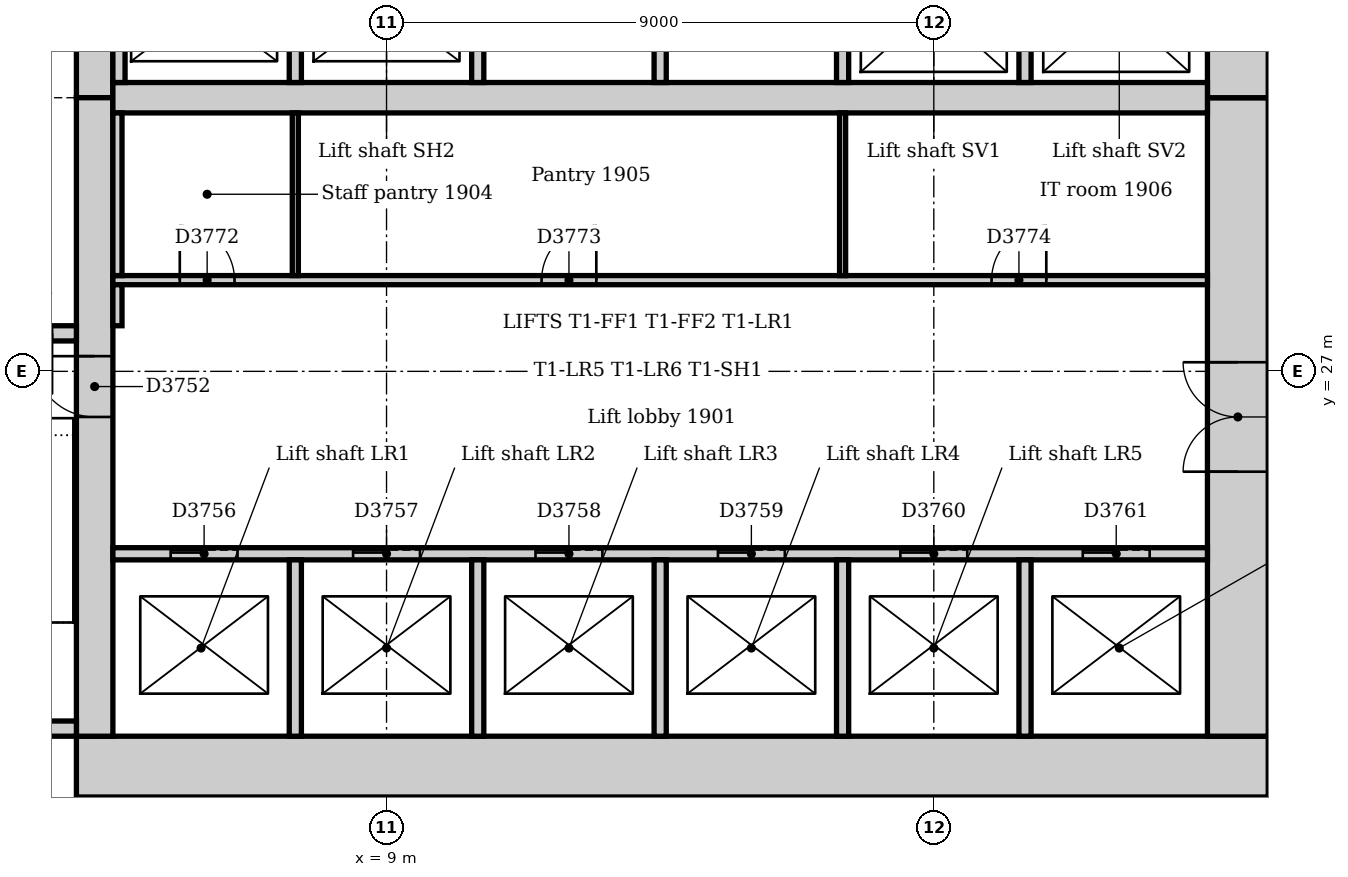
"""IFC4 building model, lengths in metres.
Left out: names, types, materials, properties, quantities, classifications, styles, units other than length and angle.
Written with IfcOpenShell. Run it as: python <this file> out.ifc"""

import sys

from ifc_helpers import new_model, si_unit, direction, frame, frame_2d, origin, place, context, subcontext, project, spatial, rectangle, extrude, element, fill, save


model = new_model("IFC4")
c1 = context("Model", 3, precision=1e-05, world=origin(), true_north=direction((0.0, 1.0)))
c2 = subcontext(c1, "Body", "Model", "MODEL_VIEW")
j1 = project(units=[si_unit("LENGTHUNIT", "METRE"), si_unit("PLANEANGLEUNIT", "RADIAN")], contexts=[c1])
p1 = place(None, origin())
s1 = spatial("IfcSite", under=j1, at=p1, CompositionType="ELEMENT")
p2 = place(p1, origin())
s2 = spatial("IfcBuilding", under=s1, at=p2, CompositionType="ELEMENT")
p3 = place(p2, frame((0.0, 0.0, 83.0)))
s3 = spatial("IfcBuildingStorey", under=s2, at=p3, CompositionType="ELEMENT", Elevation=83.0)
p4 = place(p3, frame((3.9, 20.5, 0.0), z_axis=(0.0, 0.0, 1.0), x_axis=(1.0, 0.0, 0.0)))
e1 = element("IfcWall", 1, at=p4, inside=s3, PredefinedType="SOLIDWALL", context=c2, shape_type="SweptSolid", body=[
    extrude(rectangle(XDim=19.6, YDim=1.0, at=frame_2d((9.8, 0.0))), origin(), (0.0, 0.0, 1.0), 4.0),
])
p5 = place(p3, frame((23.0, 21.0, 0.0), z_axis=(0.0, 0.0, 1.0), x_axis=(0.0, 1.0, 0.0)))
e2 = element("IfcWall", 2, at=p5, inside=s3, PredefinedType="SOLIDWALL", context=c2, shape_type="SweptSolid", body=[
    extrude(rectangle(XDim=10.5, YDim=1.0, at=frame_2d((5.25, 0.0))), origin(), (0.0, 0.0, 1.0), 4.0),
])
p6 = place(p5, frame((4.35, 0.0, 0.0)))
e3 = element("IfcOpeningElement", 3, at=p6, cuts=e2, PredefinedType="OPENING", context=c2, shape_type="SweptSolid", body=[
    extrude(rectangle(XDim=1.8, YDim=2.1, at=frame_2d((0.9, 1.05))), frame((0.0, 0.51, 0.0), z_axis=(0.0, -1.0, 0.0), x_axis=(1.0, 0.0, 0.0)), (0.0, 0.0, 1.0), 1.02),
])
p7 = place(p3, frame((23.0, 31.5, 0.0), z_axis=(0.0, 0.0, 1.0), x_axis=(0.0, 1.0, 0.0)))
e4 = element("IfcWall", 4, at=p7, inside=s3, PredefinedType="SOLIDWALL", context=c2, shape_type="SweptSolid", body=[
    extrude(rectangle(XDim=10.5, YDim=1.0, at=frame_2d((5.25, 0.0))), origin(), (0.0, 0.0, 1.0), 4.0),
])
p8 = place(p7, frame((3.15, 0.0, 0.0)))
e5 = element("IfcOpeningElement", 5, at=p8, cuts=e4, PredefinedType="OPENING", context=c2, shape_type="SweptSolid", body=[
    extrude(rectangle(XDim=1.0, YDim=2.1, at=frame_2d((0.5, 1.05))), frame((0.0, 0.51, 0.0), z_axis=(0.0, -1.0, 0.0), x_axis=(1.0, 0.0, 0.0)), (0.0, 0.0, 1.0), 1.02),
])
p9 = place(p7, frame((5.2, 0.0, 0.0)))
e6 = element("IfcOpeningElement", 6, at=p9, cuts=e4, PredefinedType="OPENING", context=c2, shape_type="SweptSolid", body=[
    extrude(rectangle(XDim=1.0, YDim=2.1, at=frame_2d((0.5, 1.05))), frame((0.0, 0.51, 0.0), z_axis=(0.0, -1.0, 0.0), x_axis=(1.0, 0.0, 0.0)), (0.0, 0.0, 1.0), 1.02),
])
p10 = place(p3, frame((4.2, 42.0, 0.0), z_axis=(0.0, 0.0, 1.0), x_axis=(0.0, -1.0, 0.0)))
e7 = element("IfcWall", 7, at=p10, inside=s3, PredefinedType="SOLIDWALL", context=c2, shape_type="SweptSolid", body=[
    extrude(rectangle(XDim=10.5, YDim=0.6, at=frame_2d((5.25, 0.0))), origin(), (0.0, 0.0, 1.0), 4.0),
])
p11 = place(p10, frame((5.3, 0.0, 0.0)))
e8 = element("IfcOpeningElement", 8, at=p11, cuts=e7, PredefinedType="OPENING", context=c2, shape_type="SweptSolid", body=[
    extrude(rectangle(XDim=1.0, YDim=2.1, at=frame_2d((0.5, 1.05))), frame((0.0, 0.31, 0.0), z_axis=(0.0, -1.0, 0.0), x_axis=(1.0, 0.0, 0.0)), (0.0, 0.0, 1.0), 0.62),
])
p12 = place(p3, frame((4.2, 31.5, 0.0), z_axis=(0.0, 0.0, 1.0), x_axis=(0.0, -1.0, 0.0)))
e9 = element("IfcWall", 9, at=p12, inside=s3, PredefinedType="SOLIDWALL", context=c2, shape_type="SweptSolid", body=[
    extrude(rectangle(XDim=10.5, YDim=0.6, at=frame_2d((5.25, 0.0))), origin(), (0.0, 0.0, 1.0), 4.0),
])
p13 = place(p12, frame((4.25, 0.0, 0.0)))
e10 = element("IfcOpeningElement", 10, at=p13, cuts=e9, PredefinedType="OPENING", context=c2, shape_type="SweptSolid", body=[
    extrude(rectangle(XDim=1.0, YDim=2.1, at=frame_2d((0.5, 1.05))), frame((0.0, 0.31, 0.0), z_axis=(0.0, -1.0, 0.0), x_axis=(1.0, 0.0, 0.0)), (0.0, 0.0, 1.0), 0.62),
])
p14 = place(p3, frame((4.5, 31.5, 0.0), z_axis=(0.0, 0.0, 1.0), x_axis=(1.0, 0.0, 0.0)))
e11 = element("IfcWall", 11, at=p14, inside=s3, PredefinedType="SOLIDWALL", context=c2, shape_type="SweptSolid", body=[
    extrude(rectangle(XDim=18.0, YDim=0.5, at=frame_2d((9.0, 0.0))), origin(), (0.0, 0.0, 1.0), 4.0),
])
p15 = place(p3, frame((0.36, 21.125, 0.0), z_axis=(0.0, 0.0, 1.0), x_axis=(1.0, 0.0, 0.0)))
e12 = element("IfcWall", 12, at=p15, inside=s3, PredefinedType="SOLIDWALL", context=c2, shape_type="SweptSolid", body=[
    extrude(rectangle(XDim=3.54, YDim=0.25, at=frame_2d((1.77, 0.0))), origin(), (0.0, 0.0, 1.0), 4.0),
])
p16 = place(p3, frame((3.9, 27.625, 0.0), z_axis=(0.0, 0.0, 1.0), x_axis=(-1.0, 0.0, 0.0)))
e13 = element("IfcWall", 13, at=p16, inside=s3, PredefinedType="SOLIDWALL", context=c2, shape_type="SweptSolid", body=[
    extrude(rectangle(XDim=3.54, YDim=0.25, at=frame_2d((1.77, 0.0))), origin(), (0.0, 0.0, 1.0), 4.0),
])
p17 = place(p16, frame((0.4, 0.0, 0.0)))
e14 = element("IfcOpeningElement", 14, at=p17, cuts=e13, PredefinedType="OPENING", context=c2, shape_type="SweptSolid", body=[
    extrude(rectangle(XDim=1.0, YDim=2.1, at=frame_2d((0.5, 1.05))), frame((0.0, 0.135, 0.0), z_axis=(0.0, -1.0, 0.0), x_axis=(1.0, 0.0, 0.0)), (0.0, 0.0, 1.0), 0.27),
])
p18 = place(p3, frame((4.5, 24.0, 0.0), z_axis=(0.0, 0.0, 1.0), x_axis=(1.0, 0.0, 0.0)))
e15 = element("IfcWall", 15, at=p18, inside=s3, PredefinedType="PARTITIONING", context=c2, shape_type="SweptSolid", body=[
    extrude(rectangle(XDim=18.0, YDim=0.2, at=frame_2d((9.0, 0.0))), origin(), (0.0, 0.0, 1.0), 3.85),
])
p19 = place(p18, frame((0.95, 0.0, 0.0)))
e16 = element("IfcOpeningElement", 16, at=p19, cuts=e15, PredefinedType="OPENING", context=c2, shape_type="SweptSolid", body=[
    extrude(rectangle(XDim=1.1, YDim=2.1, at=frame_2d((0.55, 1.05))), frame((0.0, 0.11, 0.0), z_axis=(0.0, -1.0, 0.0), x_axis=(1.0, 0.0, 0.0)), (0.0, 0.0, 1.0), 0.22),
])
p20 = place(p18, frame((3.95, 0.0, 0.0)))
e17 = element("IfcOpeningElement", 17, at=p20, cuts=e15, PredefinedType="OPENING", context=c2, shape_type="SweptSolid", body=[
    extrude(rectangle(XDim=1.1, YDim=2.1, at=frame_2d((0.55, 1.05))), frame((0.0, 0.11, 0.0), z_axis=(0.0, -1.0, 0.0), x_axis=(1.0, 0.0, 0.0)), (0.0, 0.0, 1.0), 0.22),
])
p21 = place(p18, frame((6.95, 0.0, 0.0)))
e18 = element("IfcOpeningElement", 18, at=p21, cuts=e15, PredefinedType="OPENING", context=c2, shape_type="SweptSolid", body=[
    extrude(rectangle(XDim=1.1, YDim=2.1, at=frame_2d((0.55, 1.05))), frame((0.0, 0.11, 0.0), z_axis=(0.0, -1.0, 0.0), x_axis=(1.0, 0.0, 0.0)), (0.0, 0.0, 1.0), 0.22),
])
p22 = place(p18, frame((9.95, 0.0, 0.0)))
e19 = element("IfcOpeningElement", 19, at=p22, cuts=e15, PredefinedType="OPENING", context=c2, shape_type="SweptSolid", body=[
    extrude(rectangle(XDim=1.1, YDim=2.1, at=frame_2d((0.55, 1.05))), frame((0.0, 0.11, 0.0), z_axis=(0.0, -1.0, 0.0), x_axis=(1.0, 0.0, 0.0)), (0.0, 0.0, 1.0), 0.22),
])
p23 = place(p18, frame((12.95, 0.0, 0.0)))
e20 = element("IfcOpeningElement", 20, at=p23, cuts=e15, PredefinedType="OPENING", context=c2, shape_type="SweptSolid", body=[
    extrude(rectangle(XDim=1.1, YDim=2.1, at=frame_2d((0.55, 1.05))), frame((0.0, 0.11, 0.0), z_axis=(0.0, -1.0, 0.0), x_axis=(1.0, 0.0, 0.0)), (0.0, 0.0, 1.0), 0.22),
])
p24 = place(p18, frame((15.95, 0.0, 0.0)))
e21 = element("IfcOpeningElement", 21, at=p24, cuts=e15, PredefinedType="OPENING", context=c2, shape_type="SweptSolid", body=[
    extrude(rectangle(XDim=1.1, YDim=2.1, at=frame_2d((0.55, 1.05))), frame((0.0, 0.11, 0.0), z_axis=(0.0, -1.0, 0.0), x_axis=(1.0, 0.0, 0.0)), (0.0, 0.0, 1.0), 0.22),
])
p25 = place(p3, frame((4.6, 31.75, 0.0), z_axis=(0.0, 0.0, 1.0), x_axis=(0.0, 1.0, 0.0)))
e22 = element("IfcWall", 22, at=p25, inside=s3, PredefinedType="PARTITIONING", context=c2, shape_type="SweptSolid", body=[
    extrude(rectangle(XDim=2.65, YDim=0.2, at=frame_2d((1.325, 0.0))), origin(), (0.0, 0.0, 1.0), 3.85),
])
p26 = place(p3, frame((7.5, 21.0, 0.0), z_axis=(0.0, 0.0, 1.0), x_axis=(0.0, 1.0, 0.0)))
e23 = element("IfcWall", 23, at=p26, inside=s3, PredefinedType="PARTITIONING", context=c2, shape_type="SweptSolid", body=[
    extrude(rectangle(XDim=2.9, YDim=0.2, at=frame_2d((1.45, 0.0))), origin(), (0.0, 0.0, 1.0), 3.85),
])
p27 = place(p3, frame((7.5, 31.75, 0.0), z_axis=(0.0, 0.0, 1.0), x_axis=(0.0, 1.0, 0.0)))
e24 = element("IfcWall", 24, at=p27, inside=s3, PredefinedType="PARTITIONING", context=c2, shape_type="SweptSolid", body=[
    extrude(rectangle(XDim=2.65, YDim=0.2, at=frame_2d((1.325, 0.0))), origin(), (0.0, 0.0, 1.0), 3.85),
])
p28 = place(p3, frame((10.5, 21.0, 0.0), z_axis=(0.0, 0.0, 1.0), x_axis=(0.0, 1.0, 0.0)))
e25 = element("IfcWall", 25, at=p28, inside=s3, PredefinedType="PARTITIONING", context=c2, shape_type="SweptSolid", body=[
    extrude(rectangle(XDim=2.9, YDim=0.2, at=frame_2d((1.45, 0.0))), origin(), (0.0, 0.0, 1.0), 3.85),
])
p29 = place(p3, frame((10.5, 31.75, 0.0), z_axis=(0.0, 0.0, 1.0), x_axis=(0.0, 1.0, 0.0)))
e26 = element("IfcWall", 26, at=p29, inside=s3, PredefinedType="PARTITIONING", context=c2, shape_type="SweptSolid", body=[
    extrude(rectangle(XDim=2.65, YDim=0.2, at=frame_2d((1.325, 0.0))), origin(), (0.0, 0.0, 1.0), 3.85),
])
p30 = place(p3, frame((13.5, 21.0, 0.0), z_axis=(0.0, 0.0, 1.0), x_axis=(0.0, 1.0, 0.0)))
e27 = element("IfcWall", 27, at=p30, inside=s3, PredefinedType="PARTITIONING", context=c2, shape_type="SweptSolid", body=[
    extrude(rectangle(XDim=2.9, YDim=0.2, at=frame_2d((1.45, 0.0))), origin(), (0.0, 0.0, 1.0), 3.85),
])
p31 = place(p3, frame((13.5, 31.75, 0.0), z_axis=(0.0, 0.0, 1.0), x_axis=(0.0, 1.0, 0.0)))
e28 = element("IfcWall", 28, at=p31, inside=s3, PredefinedType="PARTITIONING", context=c2, shape_type="SweptSolid", body=[
    extrude(rectangle(XDim=2.65, YDim=0.2, at=frame_2d((1.325, 0.0))), origin(), (0.0, 0.0, 1.0), 3.85),
])
p32 = place(p3, frame((16.5, 21.0, 0.0), z_axis=(0.0, 0.0, 1.0), x_axis=(0.0, 1.0, 0.0)))
e29 = element("IfcWall", 29, at=p32, inside=s3, PredefinedType="PARTITIONING", context=c2, shape_type="SweptSolid", body=[
    extrude(rectangle(XDim=2.9, YDim=0.2, at=frame_2d((1.45, 0.0))), origin(), (0.0, 0.0, 1.0), 3.85),
])
p33 = place(p3, frame((16.5, 31.75, 0.0), z_axis=(0.0, 0.0, 1.0), x_axis=(0.0, 1.0, 0.0)))
e30 = element("IfcWall", 30, at=p33, inside=s3, PredefinedType="PARTITIONING", context=c2, shape_type="SweptSolid", body=[
    extrude(rectangle(XDim=2.65, YDim=0.2, at=frame_2d((1.325, 0.0))), origin(), (0.0, 0.0, 1.0), 3.85),
])
p34 = place(p3, frame((19.5, 21.0, 0.0), z_axis=(0.0, 0.0, 1.0), x_axis=(0.0, 1.0, 0.0)))
e31 = element("IfcWall", 31, at=p34, inside=s3, PredefinedType="PARTITIONING", context=c2, shape_type="SweptSolid", body=[
    extrude(rectangle(XDim=2.9, YDim=0.2, at=frame_2d((1.45, 0.0))), origin(), (0.0, 0.0, 1.0), 3.85),
])
p35 = place(p3, frame((19.5, 31.75, 0.0), z_axis=(0.0, 0.0, 1.0), x_axis=(0.0, 1.0, 0.0)))
e32 = element("IfcWall", 32, at=p35, inside=s3, PredefinedType="PARTITIONING", context=c2, shape_type="SweptSolid", body=[
    extrude(rectangle(XDim=2.65, YDim=0.2, at=frame_2d((1.325, 0.0))), origin(), (0.0, 0.0, 1.0), 3.85),
])
p36 = place(p3, frame((4.5, 28.5, 0.0), z_axis=(0.0, 0.0, 1.0), x_axis=(1.0, 0.0, 0.0)))
e33 = element("IfcWall", 33, at=p36, inside=s3, PredefinedType="PARTITIONING", context=c2, shape_type="SweptSolid", body=[
    extrude(rectangle(XDim=18.0, YDim=0.15, at=frame_2d((9.0, 0.0))), origin(), (0.0, 0.0, 1.0), 3.85),
])
p37 = place(p36, frame((1.1, 0.0, 0.0)))
e34 = element("IfcOpeningElement", 34, at=p37, cuts=e33, PredefinedType="OPENING", context=c2, shape_type="SweptSolid", body=[
    extrude(rectangle(XDim=0.9, YDim=2.1, at=frame_2d((0.45, 1.05))), frame((0.0, 0.085, 0.0), z_axis=(0.0, -1.0, 0.0), x_axis=(1.0, 0.0, 0.0)), (0.0, 0.0, 1.0), 0.17),
])
p38 = place(p36, frame((7.05, 0.0, 0.0)))
e35 = element("IfcOpeningElement", 35, at=p38, cuts=e33, PredefinedType="OPENING", context=c2, shape_type="SweptSolid", body=[
    extrude(rectangle(XDim=0.9, YDim=2.1, at=frame_2d((0.45, 1.05))), frame((0.0, 0.085, 0.0), z_axis=(0.0, -1.0, 0.0), x_axis=(1.0, 0.0, 0.0)), (0.0, 0.0, 1.0), 0.17),
])
p39 = place(p36, frame((14.45, 0.0, 0.0)))
e36 = element("IfcOpeningElement", 36, at=p39, cuts=e33, PredefinedType="OPENING", context=c2, shape_type="SweptSolid", body=[
    extrude(rectangle(XDim=0.9, YDim=2.1, at=frame_2d((0.45, 1.05))), frame((0.0, 0.085, 0.0), z_axis=(0.0, -1.0, 0.0), x_axis=(1.0, 0.0, 0.0)), (0.0, 0.0, 1.0), 0.17),
])
p40 = place(p3, frame((4.575, 27.75, 0.0), z_axis=(0.0, 0.0, 1.0), x_axis=(0.0, 1.0, 0.0)))
e37 = element("IfcWall", 37, at=p40, inside=s3, PredefinedType="PARTITIONING", context=c2, shape_type="SweptSolid", body=[
    extrude(rectangle(XDim=0.675, YDim=0.15, at=frame_2d((0.338, 0.0))), origin(), (0.0, 0.0, 1.0), 3.85),
])
p41 = place(p3, frame((4.575, 28.575, 0.0), z_axis=(0.0, 0.0, 1.0), x_axis=(0.0, 1.0, 0.0)))
e38 = element("IfcWall", 38, at=p41, inside=s3, PredefinedType="PARTITIONING", context=c2, shape_type="SweptSolid", body=[
    extrude(rectangle(XDim=2.675, YDim=0.15, at=frame_2d((1.337, 0.0))), origin(), (0.0, 0.0, 1.0), 3.85),
])
for number, where, z_axis, x_axis in (
    (39, (7.5, 28.575, 0.0), (0.0, 0.0, 1.0), (0.0, 1.0, 0.0)),
    (40, (16.5, 28.575, 0.0), (0.0, 0.0, 1.0), (0.0, 1.0, 0.0)),
):
    element("IfcWall", number, at=place(p3, frame(where, z_axis=z_axis, x_axis=x_axis)), inside=s3, PredefinedType="PARTITIONING", context=c2, shape_type="SweptSolid", body=[
        extrude(rectangle(XDim=2.675, YDim=0.1, at=frame_2d((1.337, 0.0))), origin(), (0.0, 0.0, 1.0), 3.85),
    ])
p42 = place(p13, frame((1.0, 0.0, 0.0), z_axis=(0.0, 0.0, 1.0), x_axis=(-1.0, 0.0, 0.0)))
e41 = element("IfcDoor", 41, at=p42, inside=s3, OperationType="SINGLE_SWING_RIGHT", PredefinedType="DOOR", context=c2, shape_type="SweptSolid", body=[
    extrude(rectangle(XDim=1.0, YDim=2.1, at=frame_2d((0.5, 1.05))), frame((0.0, 0.025, 0.0), z_axis=(0.0, -1.0, 0.0), x_axis=(1.0, 0.0, 0.0)), (0.0, 0.0, 1.0), 0.05),
])
fill(e10, e41)
p43 = place(p19, origin())
e42 = element("IfcDoor", 42, at=p43, inside=s3, OperationType="SLIDING_TO_LEFT", PredefinedType="DOOR", context=c2, shape_type="SweptSolid", body=[
    extrude(rectangle(XDim=1.1, YDim=2.1, at=frame_2d((0.55, 1.05))), frame((0.0, 0.025, 0.0), z_axis=(0.0, -1.0, 0.0), x_axis=(1.0, 0.0, 0.0)), (0.0, 0.0, 1.0), 0.05),
])
fill(e16, e42)
p44 = place(p20, origin())
e43 = element("IfcDoor", 43, at=p44, inside=s3, OperationType="SLIDING_TO_LEFT", PredefinedType="DOOR", context=c2, shape_type="SweptSolid", body=[
    extrude(rectangle(XDim=1.1, YDim=2.1, at=frame_2d((0.55, 1.05))), frame((0.0, 0.025, 0.0), z_axis=(0.0, -1.0, 0.0), x_axis=(1.0, 0.0, 0.0)), (0.0, 0.0, 1.0), 0.05),
])
fill(e17, e43)
p45 = place(p21, origin())
e44 = element("IfcDoor", 44, at=p45, inside=s3, OperationType="SLIDING_TO_LEFT", PredefinedType="DOOR", context=c2, shape_type="SweptSolid", body=[
    extrude(rectangle(XDim=1.1, YDim=2.1, at=frame_2d((0.55, 1.05))), frame((0.0, 0.025, 0.0), z_axis=(0.0, -1.0, 0.0), x_axis=(1.0, 0.0, 0.0)), (0.0, 0.0, 1.0), 0.05),
])
fill(e18, e44)
p46 = place(p22, origin())
e45 = element("IfcDoor", 45, at=p46, inside=s3, OperationType="SLIDING_TO_LEFT", PredefinedType="DOOR", context=c2, shape_type="SweptSolid", body=[
    extrude(rectangle(XDim=1.1, YDim=2.1, at=frame_2d((0.55, 1.05))), frame((0.0, 0.025, 0.0), z_axis=(0.0, -1.0, 0.0), x_axis=(1.0, 0.0, 0.0)), (0.0, 0.0, 1.0), 0.05),
])
fill(e19, e45)
p47 = place(p23, origin())
e46 = element("IfcDoor", 46, at=p47, inside=s3, OperationType="SLIDING_TO_LEFT", PredefinedType="DOOR", context=c2, shape_type="SweptSolid", body=[
    extrude(rectangle(XDim=1.1, YDim=2.1, at=frame_2d((0.55, 1.05))), frame((0.0, 0.025, 0.0), z_axis=(0.0, -1.0, 0.0), x_axis=(1.0, 0.0, 0.0)), (0.0, 0.0, 1.0), 0.05),
])
fill(e20, e46)
p48 = place(p24, origin())
e47 = element("IfcDoor", 47, at=p48, inside=s3, OperationType="SLIDING_TO_LEFT", PredefinedType="DOOR", context=c2, shape_type="SweptSolid", body=[
    extrude(rectangle(XDim=1.1, YDim=2.1, at=frame_2d((0.55, 1.05))), frame((0.0, 0.025, 0.0), z_axis=(0.0, -1.0, 0.0), x_axis=(1.0, 0.0, 0.0)), (0.0, 0.0, 1.0), 0.05),
])
fill(e21, e47)
p49 = place(p6, origin())
e48 = element("IfcDoor", 48, at=p49, inside=s3, OperationType="DOUBLE_DOOR_DOUBLE_SWING", PredefinedType="DOOR", context=c2, shape_type="SweptSolid", body=[
    extrude(rectangle(XDim=1.8, YDim=2.1, at=frame_2d((0.9, 1.05))), frame((0.0, 0.025, 0.0), z_axis=(0.0, -1.0, 0.0), x_axis=(1.0, 0.0, 0.0)), (0.0, 0.0, 1.0), 0.05),
])
fill(e3, e48)
p50 = place(p37, origin())
e49 = element("IfcDoor", 49, at=p50, inside=s3, OperationType="SINGLE_SWING_LEFT", PredefinedType="DOOR", context=c2, shape_type="SweptSolid", body=[
    extrude(rectangle(XDim=0.9, YDim=2.1, at=frame_2d((0.45, 1.05))), frame((0.0, 0.025, 0.0), z_axis=(0.0, -1.0, 0.0), x_axis=(1.0, 0.0, 0.0)), (0.0, 0.0, 1.0), 0.05),
])
fill(e34, e49)
p51 = place(p38, origin())
e50 = element("IfcDoor", 50, at=p51, inside=s3, OperationType="SINGLE_SWING_RIGHT", PredefinedType="DOOR", context=c2, shape_type="SweptSolid", body=[
    extrude(rectangle(XDim=0.9, YDim=2.1, at=frame_2d((0.45, 1.05))), frame((0.0, 0.025, 0.0), z_axis=(0.0, -1.0, 0.0), x_axis=(1.0, 0.0, 0.0)), (0.0, 0.0, 1.0), 0.05),
])
fill(e35, e50)
p52 = place(p39, origin())
e51 = element("IfcDoor", 51, at=p52, inside=s3, OperationType="SINGLE_SWING_RIGHT", PredefinedType="DOOR", context=c2, shape_type="SweptSolid", body=[
    extrude(rectangle(XDim=0.9, YDim=2.1, at=frame_2d((0.45, 1.05))), frame((0.0, 0.025, 0.0), z_axis=(0.0, -1.0, 0.0), x_axis=(1.0, 0.0, 0.0)), (0.0, 0.0, 1.0), 0.05),
])
fill(e36, e51)
save(model, sys.argv[1])
